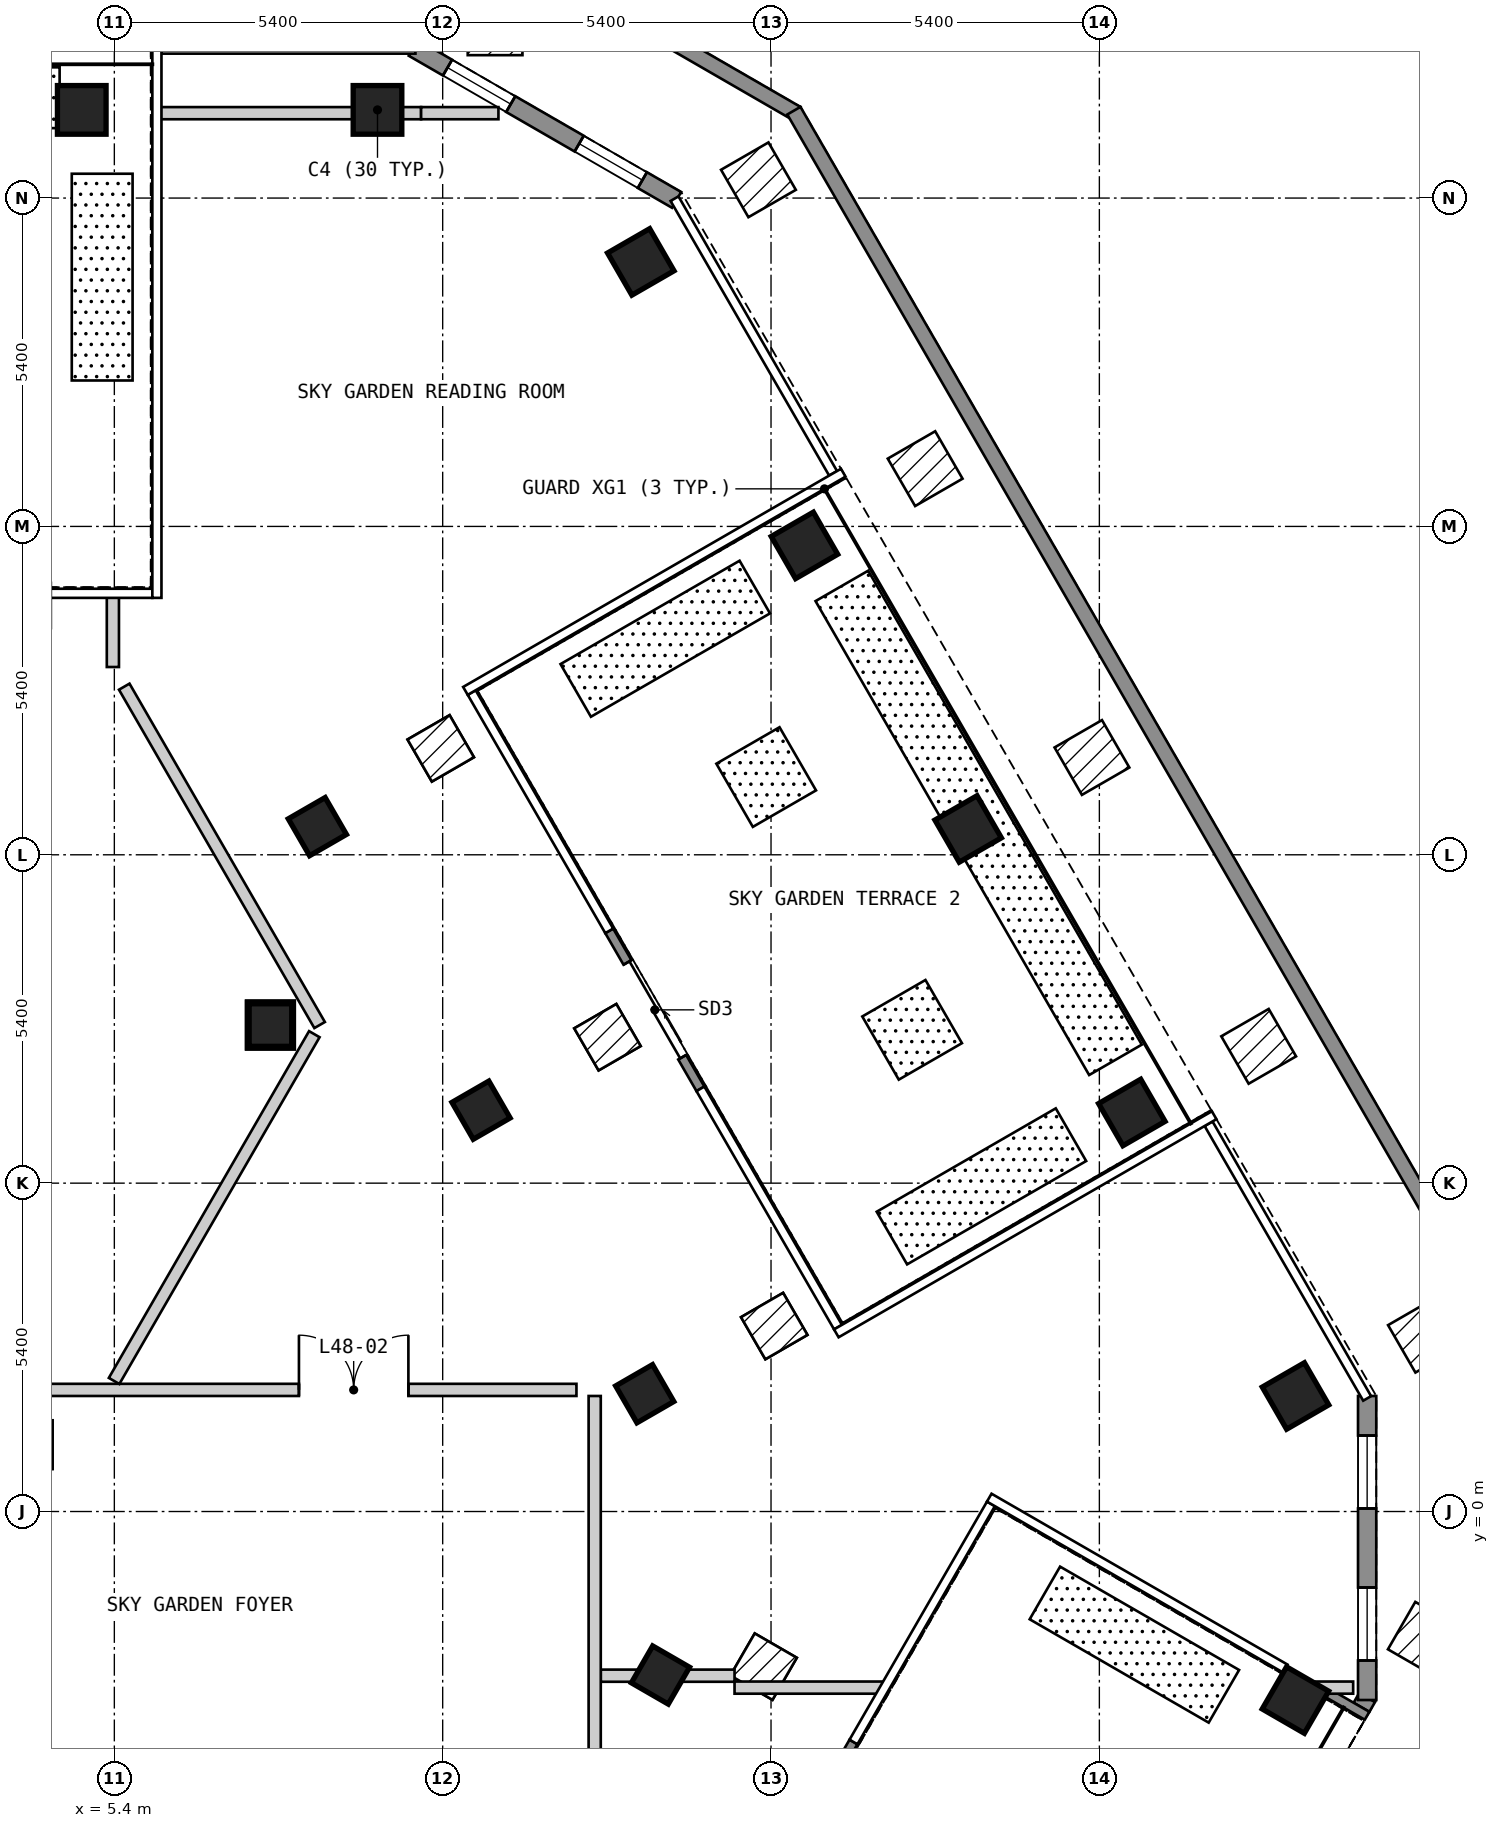
"""IFC4 building model, lengths in metres.
Left out: names, types, materials, properties, quantities, classifications, styles, units other than length and angle.
Written with IfcOpenShell. Run it as: python <this file> out.ifc"""

import sys

from ifc_helpers import new_model, si_unit, direction, frame, frame_2d, origin, origin_2d, place, context, subcontext, project, spatial, polyline, rectangle, outline, extrude, element, fill, save


model = new_model("IFC4")
c1 = context("Model", 3, precision=1e-05, world=origin(), true_north=direction((0.0, 1.0)))
c2 = subcontext(c1, "Body", "Model", "MODEL_VIEW")
j1 = project(units=[si_unit("LENGTHUNIT", "METRE"), si_unit("PLANEANGLEUNIT", "RADIAN")], contexts=[c1])
p1 = place(None, origin())
s1 = spatial("IfcSite", under=j1, at=p1, CompositionType="ELEMENT")
p2 = place(p1, origin())
s2 = spatial("IfcBuilding", under=s1, at=p2, CompositionType="ELEMENT")
p3 = place(p2, frame((0.0, 0.0, 157.2)))
s3 = spatial("IfcBuildingStorey", under=s2, at=p3, CompositionType="ELEMENT", Elevation=157.2)
for number, where, z_axis, x_axis in (
    (1, (9.728, 23.05, 0.0), (0.0, 0.0, 1.0), (-1.0, 0.0, 0.0)),
    (2, (4.864, 23.05, 0.0), (0.0, 0.0, 1.0), (-1.0, 0.0, 0.0)),
    (3, (24.825, -3.101, 0.0), (0.0, 0.0, 1.0), (0.5, 0.866, 0.0)),
    (4, (24.826, 1.9, 0.0), (0.0, 0.0, 1.0), (-0.5, 0.866, 0.0)),
    (5, (22.134, 6.562, 0.0), (0.0, 0.0, 1.0), (-0.5, 0.866, 0.0)),
    (6, (19.442, 11.225, 0.0), (0.0, 0.0, 1.0), (-0.5, 0.866, 0.0)),
    (7, (16.75, 15.888, 0.0), (0.0, 0.0, 1.0), (-0.5, 0.866, 0.0)),
    (8, (14.058, 20.55, 0.0), (0.0, 0.0, 1.0), (-0.5, 0.866, 0.0)),
):
    element("IfcColumn", number, at=place(p3, frame(where, z_axis=z_axis, x_axis=x_axis)), inside=s3, PredefinedType="COLUMN", context=c2, shape_type="SweptSolid", body=[
        extrude(rectangle(XDim=0.8, YDim=0.8, at=origin_2d()), origin(), (0.0, 0.0, 1.0), 6.0),
    ])
for number, where, z_axis, x_axis in (
    (9, (14.382, -2.689, 0.0), (0.0, 0.0, 1.0), (0.5, 0.866, 0.0)),
    (10, (14.123, 1.937, 0.0), (0.0, 0.0, 1.0), (-0.5, 0.866, 0.0)),
    (11, (11.431, 6.6, 0.0), (0.0, 0.0, 1.0), (-0.5, 0.866, 0.0)),
    (12, (7.967, 8.0, 0.0), (0.0, 0.0, 1.0), (1.0, 0.0, 0.0)),
    (13, (8.739, 11.263, 0.0), (0.0, 0.0, 1.0), (-0.5, 0.866, 0.0)),
):
    element("IfcColumn", number, at=place(p3, frame(where, z_axis=z_axis, x_axis=x_axis)), inside=s3, PredefinedType="COLUMN", context=c2, shape_type="SweptSolid", body=[
        extrude(rectangle(XDim=0.7, YDim=0.7, at=origin_2d()), origin(), (0.0, 0.0, 1.0), 6.0),
    ])
p4 = place(p3, frame((25.911, -3.22, 0.0), z_axis=(0.0, 0.0, 1.0), x_axis=(0.498843983803, 0.866691802098, 0.0)))
e14 = element("IfcWall", 14, at=p4, inside=s3, PredefinedType="SOLIDWALL", context=c2, shape_type="SweptSolid", body=[
    extrude(rectangle(XDim=0.185, YDim=0.3, at=frame_2d((0.092, 0.0))), origin(), (0.0, 0.0, 1.0), 5.7),
])
p5 = place(p3, frame((26.004, -3.1, 0.0), z_axis=(0.0, 0.0, 1.0), x_axis=(0.0, 1.0, 0.0)))
e15 = element("IfcWall", 15, at=p5, inside=s3, PredefinedType="SOLIDWALL", context=c2, shape_type="SweptSolid", body=[
    extrude(outline(polyline([(0.0, -0.15), (5.0, -0.15), (4.92, 0.15), (0.08, 0.15), (0.0, -0.15)])), origin(), (0.0, 0.0, 1.0), 5.7),
])
p6 = place(p5, frame((0.65, 0.0, 0.15)))
e16 = element("IfcOpeningElement", 16, at=p6, cuts=e15, PredefinedType="OPENING", context=c2, shape_type="SweptSolid", body=[
    extrude(rectangle(XDim=1.2, YDim=2.1, at=frame_2d((0.6, 1.05))), frame((0.0, 0.16, 0.0), z_axis=(0.0, -1.0, 0.0), x_axis=(1.0, 0.0, 0.0)), (0.0, 0.0, 1.0), 0.32),
])
p7 = place(p5, frame((3.15, 0.0, 0.15)))
e17 = element("IfcOpeningElement", 17, at=p7, cuts=e15, PredefinedType="OPENING", context=c2, shape_type="SweptSolid", body=[
    extrude(rectangle(XDim=1.2, YDim=2.1, at=frame_2d((0.6, 1.05))), frame((0.0, 0.16, 0.0), z_axis=(0.0, -1.0, 0.0), x_axis=(1.0, 0.0, 0.0)), (0.0, 0.0, 1.0), 0.32),
])
p8 = place(p3, frame((14.647, 21.57, 0.0), z_axis=(0.0, 0.0, 1.0), x_axis=(-0.866022959057, 0.500004234368, 0.0)))
e18 = element("IfcWall", 18, at=p8, inside=s3, PredefinedType="SOLIDWALL", context=c2, shape_type="SweptSolid", body=[
    extrude(outline(polyline([(0.0, -0.15), (5.0, -0.15), (4.92, 0.15), (0.08, 0.15), (0.0, -0.15)])), origin(), (0.0, 0.0, 1.0), 5.7),
])
p9 = place(p8, frame((0.65, 0.0, 0.15)))
e19 = element("IfcOpeningElement", 19, at=p9, cuts=e18, PredefinedType="OPENING", context=c2, shape_type="SweptSolid", body=[
    extrude(rectangle(XDim=1.2, YDim=2.1, at=frame_2d((0.6, 1.05))), frame((0.0, 0.16, 0.0), z_axis=(0.0, -1.0, 0.0), x_axis=(1.0, 0.0, 0.0)), (0.0, 0.0, 1.0), 0.32),
])
p10 = place(p8, frame((3.15, 0.0, 0.15)))
e20 = element("IfcOpeningElement", 20, at=p10, cuts=e18, PredefinedType="OPENING", context=c2, shape_type="SweptSolid", body=[
    extrude(rectangle(XDim=1.2, YDim=2.1, at=frame_2d((0.6, 1.05))), frame((0.0, 0.16, 0.0), z_axis=(0.0, -1.0, 0.0), x_axis=(1.0, 0.0, 0.0)), (0.0, 0.0, 1.0), 0.32),
])
p11 = place(p3, frame((16.056, -6.388, 0.0), z_axis=(0.0, 0.0, 1.0), x_axis=(0.50002537861, 0.866010750942, 0.0)))
e21 = element("IfcWall", 21, at=p11, inside=s3, PredefinedType="SOLIDWALL", context=c2, shape_type="SweptSolid", body=[
    extrude(rectangle(XDim=3.0, YDim=0.15, at=frame_2d((1.5, 0.0))), origin(), (0.0, 0.0, 1.0), 5.7),
])
p12 = place(p11, frame((0.6, 0.0, 0.0)))
e22 = element("IfcOpeningElement", 22, at=p12, cuts=e21, PredefinedType="OPENING", context=c2, shape_type="SweptSolid", body=[
    extrude(rectangle(XDim=1.8, YDim=2.4, at=frame_2d((0.9, 1.2))), frame((0.0, 0.085, 0.0), z_axis=(0.0, -1.0, 0.0), x_axis=(1.0, 0.0, 0.0)), (0.0, 0.0, 1.0), 0.17),
])
p13 = place(p3, frame((26.003, -3.359, 0.0), z_axis=(0.0, 0.0, 1.0), x_axis=(-0.86636022879, 0.499419617126, 0.0)))
e23 = element("IfcWall", 23, at=p13, inside=s3, PredefinedType="SOLIDWALL", context=c2, shape_type="SweptSolid", body=[
    extrude(rectangle(XDim=0.745, YDim=0.15, at=frame_2d((0.372, 0.0))), origin(), (0.0, 0.0, 1.0), 5.7),
])
p14 = place(p3, frame((15.039, 6.951, 0.0), z_axis=(0.0, 0.0, 1.0), x_axis=(-0.499990139034, 0.866031096941, 0.0)))
e24 = element("IfcWall", 24, at=p14, inside=s3, PredefinedType="SOLIDWALL", context=c2, shape_type="SweptSolid", body=[
    extrude(rectangle(XDim=3.0, YDim=0.15, at=frame_2d((1.5, 0.0))), origin(), (0.0, 0.0, 1.0), 5.7),
])
p15 = place(p14, frame((0.6, 0.0, 0.0)))
e25 = element("IfcOpeningElement", 25, at=p15, cuts=e24, PredefinedType="OPENING", context=c2, shape_type="SweptSolid", body=[
    extrude(rectangle(XDim=1.8, YDim=2.4, at=frame_2d((0.9, 1.2))), frame((0.0, 0.085, 0.0), z_axis=(0.0, -1.0, 0.0), x_axis=(1.0, 0.0, 0.0)), (0.0, 0.0, 1.0), 0.17),
])
p16 = place(p3, frame((12.293, 25.492, 0.0), z_axis=(0.0, 0.0, 1.0), x_axis=(0.865889515344, -0.500235291855, 0.0)))
e26 = element("IfcWall", 26, at=p16, inside=s3, PredefinedType="PARAPET", context=c2, shape_type="SweptSolid", body=[
    extrude(outline(polyline([(0.067, -0.125), (4.933, -0.125), (5.0, 0.125), (0.0, 0.125), (0.067, -0.125)])), origin(), (0.0, 0.0, 1.0), 1.6),
])
p17 = place(p3, frame((16.576, 23.037, 0.0), z_axis=(0.0, 0.0, 1.0), x_axis=(0.500065532695, -0.865987565159, 0.0)))
e27 = element("IfcWall", 27, at=p17, inside=s3, PredefinedType="PARAPET", context=c2, shape_type="SweptSolid", body=[
    extrude(outline(polyline([(0.067, -0.125), (23.258, -0.125), (23.325, 0.125), (0.0, 0.125), (0.067, -0.125)])), origin(), (0.0, 0.0, 1.0), 1.6),
])
p18 = place(p3, frame((28.24, -2.038, 0.0), z_axis=(0.0, 0.0, 1.0), x_axis=(-0.500068533128, -0.865985832549, 0.0)))
e28 = element("IfcWall", 28, at=p18, inside=s3, PredefinedType="PARAPET", context=c2, shape_type="SweptSolid", body=[
    extrude(outline(polyline([(0.067, -0.125), (24.644, -0.125), (24.71, 0.125), (0.0, 0.125), (0.067, -0.125)])), origin(), (0.0, 0.0, 1.0), 1.6),
])
p19 = place(p3, frame((15.6, -2.896, 0.0), z_axis=(0.0, 0.0, 1.0), x_axis=(1.0, 0.0, 0.0)))
e29 = element("IfcWall", 29, at=p19, inside=s3, PredefinedType="PARTITIONING", context=c2, shape_type="SweptSolid", body=[
    extrude(rectangle(XDim=2.496, YDim=0.2, at=frame_2d((1.248, 0.0))), origin(), (0.0, 0.0, 1.0), 5.7),
])
p20 = place(p3, frame((25.16, -2.896, 0.0), z_axis=(0.0, 0.0, 1.0), x_axis=(1.0, 0.0, 0.0)))
e30 = element("IfcWall", 30, at=p20, inside=s3, PredefinedType="PARTITIONING", context=c2, shape_type="SweptSolid", body=[
    extrude(rectangle(XDim=0.614, YDim=0.2, at=frame_2d((0.307, 0.0))), origin(), (0.0, 0.0, 1.0), 5.7),
])
p21 = place(p3, frame((13.4, -2.7, 0.0), z_axis=(0.0, 0.0, 1.0), x_axis=(1.0, 0.0, 0.0)))
e31 = element("IfcWall", 31, at=p21, inside=s3, PredefinedType="PARTITIONING", context=c2, shape_type="SweptSolid", body=[
    extrude(rectangle(XDim=2.2, YDim=0.2, at=frame_2d((1.1, 0.0))), origin(), (0.0, 0.0, 1.0), 5.7),
])
p22 = place(p3, frame((-24.451, 2.0, 0.0), z_axis=(0.0, 0.0, 1.0), x_axis=(1.0, 0.0, 0.0)))
e32 = element("IfcWall", 32, at=p22, inside=s3, PredefinedType="PARTITIONING", context=c2, shape_type="SweptSolid", body=[
    extrude(rectangle(XDim=37.451, YDim=0.2, at=frame_2d((18.726, 0.0))), origin(), (0.0, 0.0, 1.0), 5.7),
])
p23 = place(p22, frame((32.887, 0.0, 0.0)))
e33 = element("IfcOpeningElement", 33, at=p23, cuts=e32, PredefinedType="OPENING", context=c2, shape_type="SweptSolid", body=[
    extrude(rectangle(XDim=1.8, YDim=2.1, at=frame_2d((0.9, 1.05))), frame((0.0, 0.11, 0.0), z_axis=(0.0, -1.0, 0.0), x_axis=(1.0, 0.0, 0.0)), (0.0, 0.0, 1.0), 0.22),
])
p24 = place(p22, frame((23.551, 0.0, 0.0)))
e34 = element("IfcOpeningElement", 34, at=p24, cuts=e32, PredefinedType="OPENING", context=c2, shape_type="SweptSolid", body=[
    extrude(rectangle(XDim=1.8, YDim=2.1, at=frame_2d((0.9, 1.05))), frame((0.0, 0.11, 0.0), z_axis=(0.0, -1.0, 0.0), x_axis=(1.0, 0.0, 0.0)), (0.0, 0.0, 1.0), 0.22),
])
p25 = place(p22, frame((15.553, 0.0, 0.0)))
e35 = element("IfcOpeningElement", 35, at=p25, cuts=e32, PredefinedType="OPENING", context=c2, shape_type="SweptSolid", body=[
    extrude(rectangle(XDim=1.8, YDim=2.1, at=frame_2d((0.9, 1.05))), frame((0.0, 0.11, 0.0), z_axis=(0.0, -1.0, 0.0), x_axis=(1.0, 0.0, 0.0)), (0.0, 0.0, 1.0), 0.22),
])
p26 = place(p3, frame((6.08, 22.996, 0.0), z_axis=(0.0, 0.0, 1.0), x_axis=(1.0, 0.0, 0.0)))
e36 = element("IfcWall", 36, at=p26, inside=s3, PredefinedType="PARTITIONING", context=c2, shape_type="SweptSolid", body=[
    extrude(rectangle(XDim=3.559, YDim=0.2, at=frame_2d((1.779, 0.0))), origin(), (0.0, 0.0, 1.0), 5.12),
])
p27 = place(p3, frame((9.639, 22.996, 0.0), z_axis=(0.0, 0.0, 1.0), x_axis=(1.0, 0.0, 0.0)))
e37 = element("IfcWall", 37, at=p27, inside=s3, PredefinedType="PARTITIONING", context=c2, shape_type="SweptSolid", body=[
    extrude(rectangle(XDim=0.089, YDim=0.2, at=frame_2d((0.044, 0.0))), origin(), (0.0, 0.0, 1.0), 5.12),
])
p28 = place(p3, frame((9.728, 22.996, 0.0), z_axis=(0.0, 0.0, 1.0), x_axis=(1.0, 0.0, 0.0)))
e38 = element("IfcWall", 38, at=p28, inside=s3, PredefinedType="PARTITIONING", context=c2, shape_type="SweptSolid", body=[
    extrude(rectangle(XDim=0.717, YDim=0.2, at=frame_2d((0.358, 0.0))), origin(), (0.0, 0.0, 1.0), 5.12),
])
p29 = place(p3, frame((10.445, 22.996, 0.0), z_axis=(0.0, 0.0, 1.0), x_axis=(1.0, 0.0, 0.0)))
e39 = element("IfcWall", 39, at=p29, inside=s3, PredefinedType="PARTITIONING", context=c2, shape_type="SweptSolid", body=[
    extrude(rectangle(XDim=1.272, YDim=0.2, at=frame_2d((0.636, 0.0))), origin(), (0.0, 0.0, 1.0), 5.7),
])
p30 = place(p3, frame((5.376, 13.888, 0.0), z_axis=(0.0, 0.0, 1.0), x_axis=(0.0, 1.0, 0.0)))
e40 = element("IfcWall", 40, at=p30, inside=s3, PredefinedType="PARTITIONING", context=c2, shape_type="SweptSolid", body=[
    extrude(rectangle(XDim=1.232, YDim=0.2, at=frame_2d((0.616, 0.0))), origin(), (0.0, 0.0, 1.0), 5.7),
])
p31 = place(p3, frame((13.3, -4.88, 0.0), z_axis=(0.0, 0.0, 1.0), x_axis=(0.0, 1.0, 0.0)))
e41 = element("IfcWall", 41, at=p31, inside=s3, PredefinedType="PARTITIONING", context=c2, shape_type="SweptSolid", body=[
    extrude(rectangle(XDim=6.78, YDim=0.2, at=frame_2d((3.39, 0.0))), origin(), (0.0, 0.0, 1.0), 5.7),
])
p32 = place(p3, frame((5.563, 13.565, 0.0), z_axis=(0.0, 0.0, 1.0), x_axis=(0.499996522553, -0.86602741148, 0.0)))
e42 = element("IfcWall", 42, at=p32, inside=s3, PredefinedType="PARTITIONING", context=c2, shape_type="SweptSolid", body=[
    extrude(rectangle(XDim=6.426, YDim=0.2, at=frame_2d((3.213, 0.0))), origin(), (0.0, 0.0, 1.0), 5.7),
])
p33 = place(p3, frame((5.396, 2.147, 0.0), z_axis=(0.0, 0.0, 1.0), x_axis=(0.500030520673, 0.866007781949, 0.0)))
e43 = element("IfcWall", 43, at=p33, inside=s3, PredefinedType="PARTITIONING", context=c2, shape_type="SweptSolid", body=[
    extrude(rectangle(XDim=6.585, YDim=0.2, at=frame_2d((3.293, 0.0))), origin(), (0.0, 0.0, 1.0), 5.7),
])
p34 = place(p6, origin())
e44 = element("IfcWindow", 44, at=p34, inside=s3, PartitioningType="SINGLE_PANEL", PredefinedType="WINDOW", context=c2, shape_type="SweptSolid", body=[
    extrude(rectangle(XDim=1.2, YDim=2.1, at=frame_2d((0.6, 1.05))), frame((0.0, 0.03, 0.0), z_axis=(0.0, -1.0, 0.0), x_axis=(1.0, 0.0, 0.0)), (0.0, 0.0, 1.0), 0.06),
])
fill(e16, e44)
p35 = place(p7, origin())
e45 = element("IfcWindow", 45, at=p35, inside=s3, PartitioningType="SINGLE_PANEL", PredefinedType="WINDOW", context=c2, shape_type="SweptSolid", body=[
    extrude(rectangle(XDim=1.2, YDim=2.1, at=frame_2d((0.6, 1.05))), frame((0.0, 0.03, 0.0), z_axis=(0.0, -1.0, 0.0), x_axis=(1.0, 0.0, 0.0)), (0.0, 0.0, 1.0), 0.06),
])
fill(e17, e45)
p36 = place(p9, origin())
e46 = element("IfcWindow", 46, at=p36, inside=s3, PartitioningType="SINGLE_PANEL", PredefinedType="WINDOW", context=c2, shape_type="SweptSolid", body=[
    extrude(rectangle(XDim=1.2, YDim=2.1, at=frame_2d((0.6, 1.05))), frame((0.0, 0.03, 0.0), z_axis=(0.0, -1.0, 0.0), x_axis=(1.0, 0.0, 0.0)), (0.0, 0.0, 1.0), 0.06),
])
fill(e19, e46)
p37 = place(p10, origin())
e47 = element("IfcWindow", 47, at=p37, inside=s3, PartitioningType="SINGLE_PANEL", PredefinedType="WINDOW", context=c2, shape_type="SweptSolid", body=[
    extrude(rectangle(XDim=1.2, YDim=2.1, at=frame_2d((0.6, 1.05))), frame((0.0, 0.03, 0.0), z_axis=(0.0, -1.0, 0.0), x_axis=(1.0, 0.0, 0.0)), (0.0, 0.0, 1.0), 0.06),
])
fill(e20, e47)
p38 = place(p15, origin())
e48 = element("IfcDoor", 48, at=p38, inside=s3, OperationType="SLIDING_TO_LEFT", PredefinedType="DOOR", context=c2, shape_type="SweptSolid", body=[
    extrude(rectangle(XDim=1.8, YDim=2.4, at=frame_2d((0.9, 1.2))), frame((0.0, 0.025, 0.0), z_axis=(0.0, -1.0, 0.0), x_axis=(1.0, 0.0, 0.0)), (0.0, 0.0, 1.0), 0.05),
])
fill(e25, e48)
p39 = place(p23, origin())
e49 = element("IfcDoor", 49, at=p39, inside=s3, OperationType="DOUBLE_DOOR_SINGLE_SWING", PredefinedType="DOOR", context=c2, shape_type="SweptSolid", body=[
    extrude(rectangle(XDim=1.8, YDim=2.1, at=frame_2d((0.9, 1.05))), frame((0.0, 0.025, 0.0), z_axis=(0.0, -1.0, 0.0), x_axis=(1.0, 0.0, 0.0)), (0.0, 0.0, 1.0), 0.05),
])
fill(e33, e49)
save(model, sys.argv[1])
